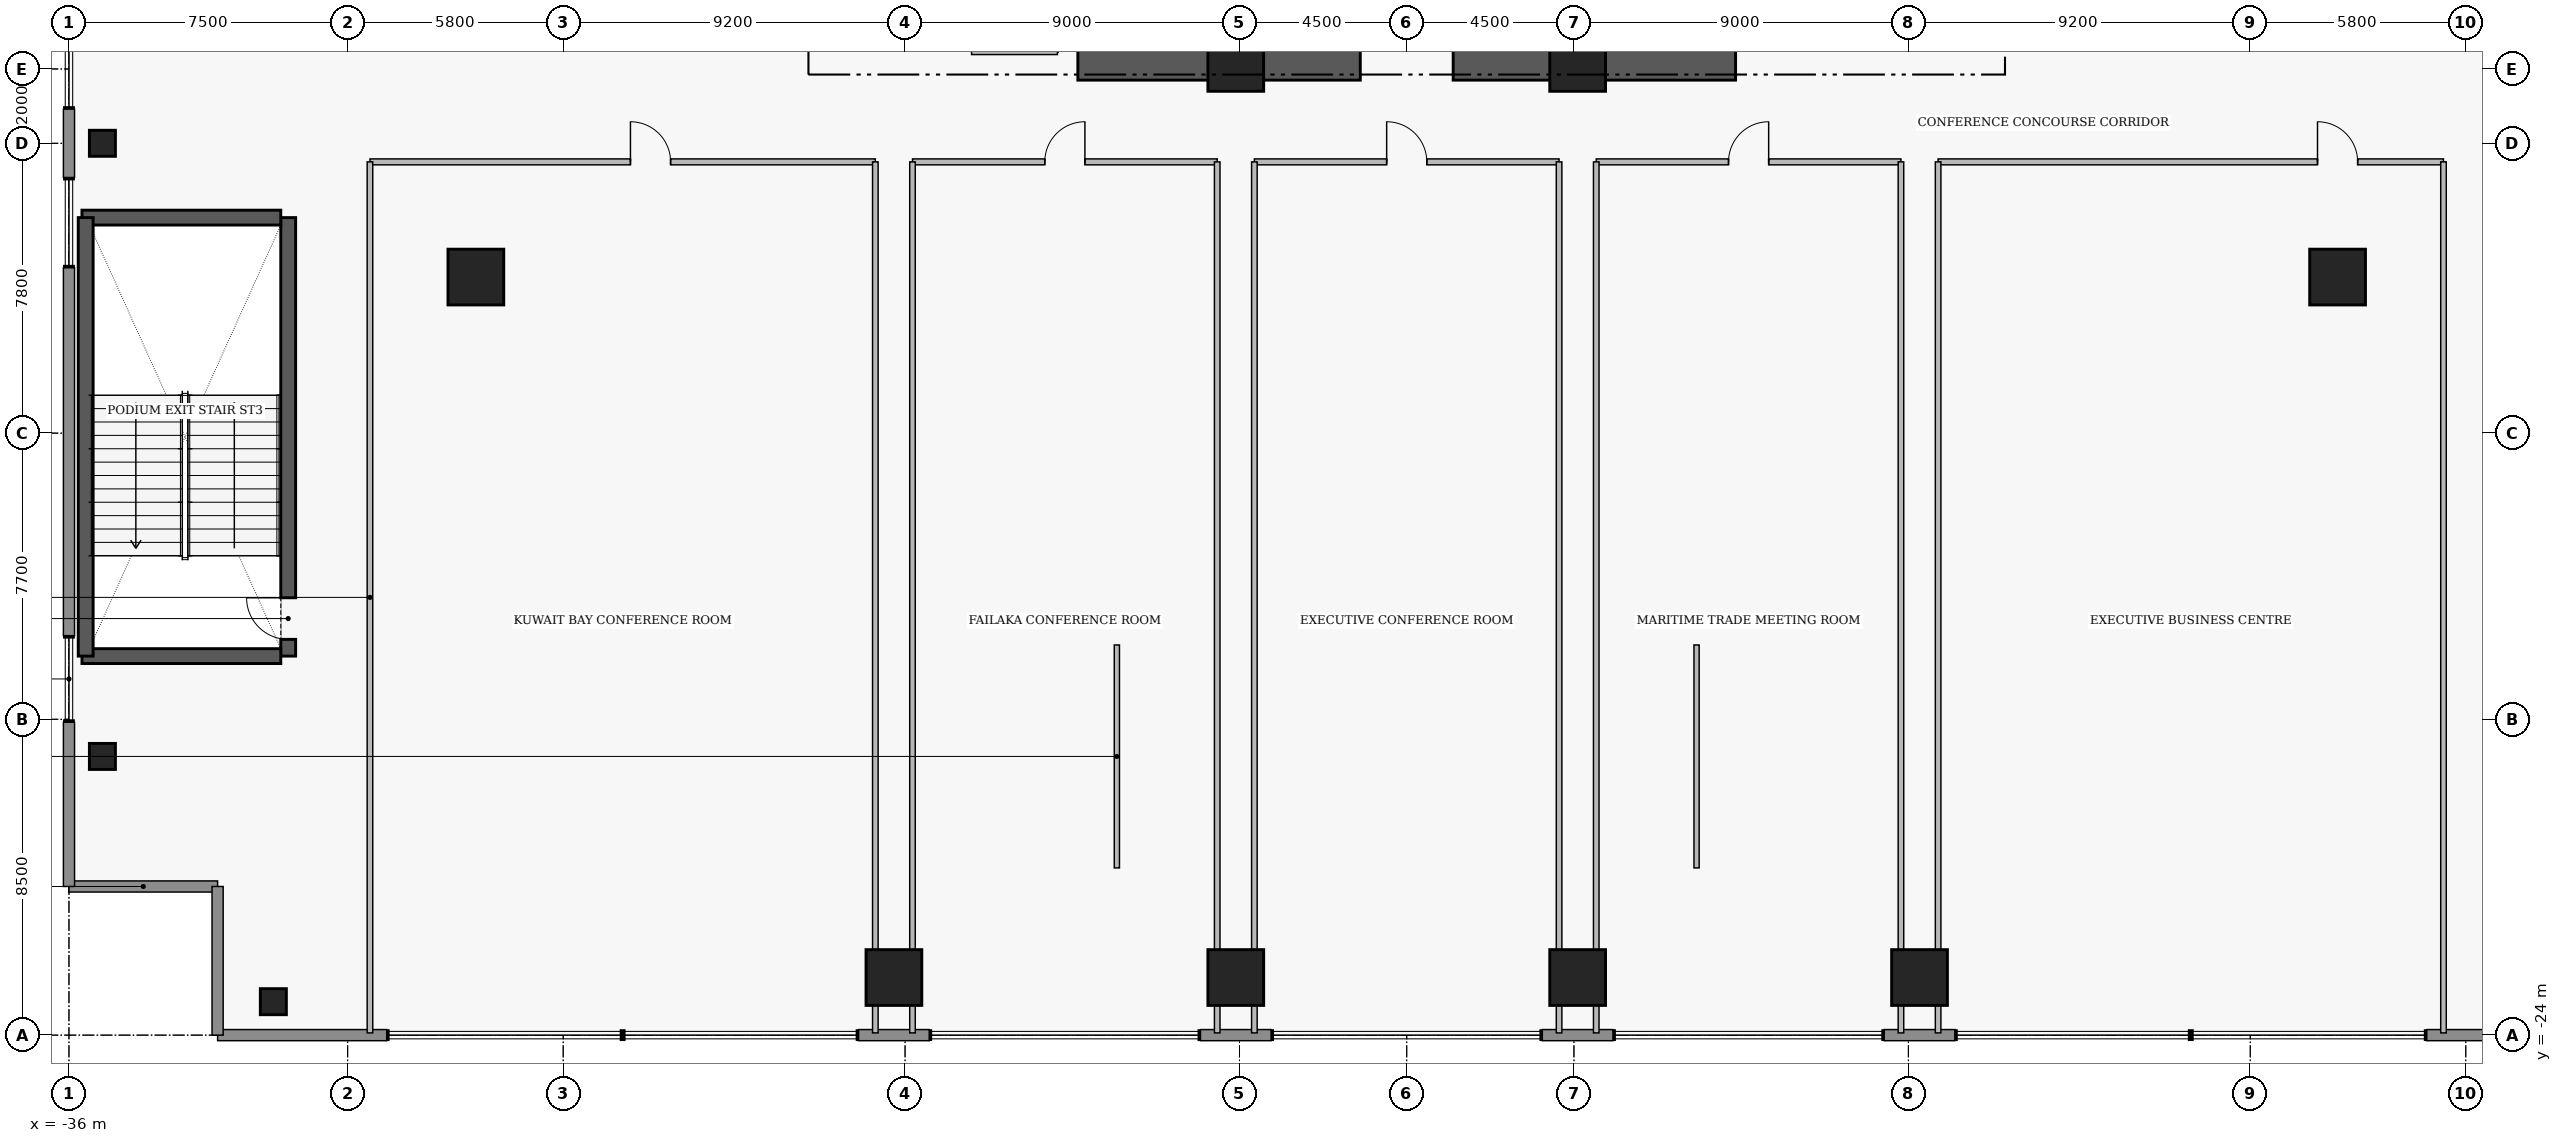
"""IFC4 building model, lengths in metres.
Left out: names, types, materials, properties, quantities, classifications, styles, units other than length and angle.
Written with IfcOpenShell. Run it as: python <this file> out.ifc"""

import sys

from ifc_helpers import new_model, si_unit, direction, frame, frame_2d, origin, origin_2d, place, context, subcontext, project, spatial, rectangle, extrude, element, fill, save


model = new_model("IFC4")
c1 = context("Model", 3, precision=1e-05, world=origin(), true_north=direction((0.0, 1.0)))
c2 = subcontext(c1, "Body", "Model", "MODEL_VIEW")
j1 = project(units=[si_unit("LENGTHUNIT", "METRE"), si_unit("PLANEANGLEUNIT", "RADIAN")], contexts=[c1])
p1 = place(None, origin())
s1 = spatial("IfcSite", under=j1, at=p1, CompositionType="ELEMENT")
p2 = place(p1, origin())
s2 = spatial("IfcBuilding", under=s1, at=p2, CompositionType="ELEMENT")
p3 = place(p2, frame((0.0, 0.0, 18.0)))
s3 = spatial("IfcBuildingStorey", under=s2, at=p3, CompositionType="ELEMENT", Elevation=18.0)
for number, where, z_axis, x_axis in (
    (1, (-8.85, 2.15, 0.0), (0.0, 0.0, 1.0), (1.0, 0.0, 0.0)),
    (2, (1.25, 2.15, 0.0), (0.0, 0.0, 1.0), (1.0, 0.0, 0.0)),
):
    element("IfcWall", number, at=place(p3, frame(where, z_axis=z_axis, x_axis=x_axis)), inside=s3, PredefinedType="SHEAR", context=c2, shape_type="SweptSolid", body=[
        extrude(rectangle(XDim=7.6, YDim=0.9, at=frame_2d((3.8, 0.0))), origin(), (0.0, 0.0, 1.0), 4.54),
    ])
p4 = place(p3, frame((-30.1, -13.8, 0.0), z_axis=(0.0, 0.0, 1.0), x_axis=(0.0, 1.0, 0.0)))
e3 = element("IfcWall", 3, at=p4, inside=s3, PredefinedType="SHEAR", context=c2, shape_type="SweptSolid", body=[
    extrude(rectangle(XDim=11.8, YDim=0.4, at=frame_2d((5.9, 0.0))), origin(), (0.0, 0.0, 1.0), 4.61),
])
p5 = place(p4, frame((0.45, 0.0, 0.0)))
e4 = element("IfcOpeningElement", 4, at=p5, cuts=e3, PredefinedType="OPENING", context=c2, shape_type="SweptSolid", body=[
    extrude(rectangle(XDim=1.12, YDim=2.22, at=frame_2d((0.56, 1.11))), frame((0.0, 0.21, 0.0), z_axis=(0.0, -1.0, 0.0), x_axis=(1.0, 0.0, 0.0)), (0.0, 0.0, 1.0), 0.42),
])
for number, where, z_axis, x_axis in (
    (5, (-35.65, -13.8, 0.0), (0.0, 0.0, 1.0), (1.0, 0.0, 0.0)),
    (6, (-35.65, -2.0, 0.0), (0.0, 0.0, 1.0), (1.0, 0.0, 0.0)),
):
    element("IfcWall", number, at=place(p3, frame(where, z_axis=z_axis, x_axis=x_axis)), inside=s3, PredefinedType="SHEAR", context=c2, shape_type="SweptSolid", body=[
        extrude(rectangle(XDim=5.35, YDim=0.4, at=frame_2d((2.675, 0.0))), origin(), (0.0, 0.0, 1.0), 4.61),
    ])
p6 = place(p3, frame((-35.55, -13.8, 0.0), z_axis=(0.0, 0.0, 1.0), x_axis=(0.0, 1.0, 0.0)))
e7 = element("IfcWall", 7, at=p6, inside=s3, PredefinedType="SHEAR", context=c2, shape_type="SweptSolid", body=[
    extrude(rectangle(XDim=11.8, YDim=0.4, at=frame_2d((5.9, 0.0))), origin(), (0.0, 0.0, 1.0), 4.61),
])
for number, where, z_axis, x_axis in (
    (8, (-4.6, 2.15, 0.0), (0.0, 0.0, 1.0), (1.0, 0.0, 0.0)),
    (9, (4.6, 2.15, 0.0), (0.0, 0.0, 1.0), (1.0, 0.0, 0.0)),
    (10, (-13.8, -22.45, 0.0), (0.0, 0.0, 1.0), (1.0, 0.0, 0.0)),
    (11, (-4.6, -22.45, 0.0), (0.0, 0.0, 1.0), (1.0, 0.0, 0.0)),
    (12, (4.6, -22.45, 0.0), (0.0, 0.0, 1.0), (1.0, 0.0, 0.0)),
    (13, (13.8, -22.45, 0.0), (0.0, 0.0, 1.0), (1.0, 0.0, 0.0)),
    (14, (-25.05, -3.6, 0.0), (0.0, 0.0, 1.0), (1.0, 0.0, 0.0)),
    (15, (25.05, -3.6, 0.0), (0.0, 0.0, 1.0), (1.0, 0.0, 0.0)),
):
    element("IfcColumn", number, at=place(p3, frame(where, z_axis=z_axis, x_axis=x_axis)), inside=s3, PredefinedType="COLUMN", context=c2, shape_type="SweptSolid", body=[
        extrude(rectangle(XDim=1.5, YDim=1.5, at=origin_2d()), origin(), (0.0, 0.0, 1.0), 4.8),
    ])
for number, where, z_axis, x_axis in (
    (16, (-30.5, -23.1, 0.0), (0.0, 0.0, 1.0), (1.0, 0.0, 0.0)),
    (17, (-35.1, -16.5, 0.0), (0.0, 0.0, 1.0), (1.0, 0.0, 0.0)),
    (18, (-35.1, 0.0, 0.0), (0.0, 0.0, 1.0), (1.0, 0.0, 0.0)),
):
    element("IfcColumn", number, at=place(p3, frame(where, z_axis=z_axis, x_axis=x_axis)), inside=s3, PredefinedType="COLUMN", context=c2, shape_type="SweptSolid", body=[
        extrude(rectangle(XDim=0.7, YDim=0.7, at=origin_2d()), origin(), (0.0, 0.0, 1.0), 4.8),
    ])
p7 = place(p3, frame((-32.0, -20.0, 0.0), z_axis=(0.0, 0.0, 1.0), x_axis=(-1.0, 0.0, 0.0)))
e19 = element("IfcWall", 19, at=p7, inside=s3, PredefinedType="STANDARD", context=c2, shape_type="SweptSolid", body=[
    extrude(rectangle(XDim=4.0, YDim=0.3, at=frame_2d((2.0, 0.0))), origin(), (0.0, 0.0, 1.0), 4.54),
])
p8 = place(p3, frame((-36.0, -20.0, 0.0), z_axis=(0.0, 0.0, 1.0), x_axis=(0.0, 1.0, 0.0)))
e20 = element("IfcWall", 20, at=p8, inside=s3, PredefinedType="STANDARD", context=c2, shape_type="SweptSolid", body=[
    extrude(rectangle(XDim=4.42, YDim=0.3, at=frame_2d((2.21, 0.0))), origin(), (0.0, 0.0, 1.0), 4.54),
])
p9 = place(p3, frame((-36.0, -13.25, 0.0), z_axis=(0.0, 0.0, 1.0), x_axis=(0.0, 1.0, 0.0)))
e21 = element("IfcWall", 21, at=p9, inside=s3, PredefinedType="STANDARD", context=c2, shape_type="SweptSolid", body=[
    extrude(rectangle(XDim=9.9, YDim=0.3, at=frame_2d((4.95, 0.0))), origin(), (0.0, 0.0, 1.0), 4.54),
])
p10 = place(p3, frame((-36.0, -0.92, 0.0), z_axis=(0.0, 0.0, 1.0), x_axis=(0.0, 1.0, 0.0)))
e22 = element("IfcWall", 22, at=p10, inside=s3, PredefinedType="STANDARD", context=c2, shape_type="SweptSolid", body=[
    extrude(rectangle(XDim=1.84, YDim=0.3, at=frame_2d((0.92, 0.0))), origin(), (0.0, 0.0, 1.0), 4.54),
])
p11 = place(p3, frame((32.0, -24.0, 0.0), z_axis=(0.0, 0.0, 1.0), x_axis=(-1.0, 0.0, 0.0)))
e23 = element("IfcWall", 23, at=p11, inside=s3, PredefinedType="STANDARD", context=c2, shape_type="SweptSolid", body=[
    extrude(rectangle(XDim=4.55, YDim=0.3, at=frame_2d((2.275, 0.0))), origin(), (0.0, 0.0, 1.0), 4.54),
])
p12 = place(p3, frame((14.75, -24.0, 0.0), z_axis=(0.0, 0.0, 1.0), x_axis=(-1.0, 0.0, 0.0)))
e24 = element("IfcWall", 24, at=p12, inside=s3, PredefinedType="STANDARD", context=c2, shape_type="SweptSolid", body=[
    extrude(rectangle(XDim=1.9, YDim=0.3, at=frame_2d((0.95, 0.0))), origin(), (0.0, 0.0, 1.0), 4.54),
])
for number, where, z_axis, x_axis in (
    (25, (5.55, -24.0, 0.0), (0.0, 0.0, 1.0), (-1.0, 0.0, 0.0)),
    (26, (-3.65, -24.0, 0.0), (0.0, 0.0, 1.0), (-1.0, 0.0, 0.0)),
):
    element("IfcWall", number, at=place(p3, frame(where, z_axis=z_axis, x_axis=x_axis)), inside=s3, PredefinedType="STANDARD", context=c2, shape_type="SweptSolid", body=[
        extrude(rectangle(XDim=1.9, YDim=0.3, at=frame_2d((0.95, 0.0))), origin(), (0.0, 0.0, 1.0), 4.54),
    ])
p13 = place(p3, frame((-12.85, -24.0, 0.0), z_axis=(0.0, 0.0, 1.0), x_axis=(-1.0, 0.0, 0.0)))
e27 = element("IfcWall", 27, at=p13, inside=s3, PredefinedType="STANDARD", context=c2, shape_type="SweptSolid", body=[
    extrude(rectangle(XDim=1.9, YDim=0.3, at=frame_2d((0.95, 0.0))), origin(), (0.0, 0.0, 1.0), 4.54),
])
p14 = place(p3, frame((-27.45, -24.0, 0.0), z_axis=(0.0, 0.0, 1.0), x_axis=(-1.0, 0.0, 0.0)))
e28 = element("IfcWall", 28, at=p14, inside=s3, PredefinedType="STANDARD", context=c2, shape_type="SweptSolid", body=[
    extrude(rectangle(XDim=4.55, YDim=0.3, at=frame_2d((2.275, 0.0))), origin(), (0.0, 0.0, 1.0), 4.54),
])
p15 = place(p3, frame((-32.0, -24.0, 0.0), z_axis=(0.0, 0.0, 1.0), x_axis=(0.0, 1.0, 0.0)))
e29 = element("IfcWall", 29, at=p15, inside=s3, PredefinedType="STANDARD", context=c2, shape_type="SweptSolid", body=[
    extrude(rectangle(XDim=4.0, YDim=0.3, at=frame_2d((2.0, 0.0))), origin(), (0.0, 0.0, 1.0), 4.54),
])
p16 = place(p3, frame((-27.9, -0.5, 0.0), z_axis=(0.0, 0.0, 1.0), x_axis=(1.0, 0.0, 0.0)))
e30 = element("IfcWall", 30, at=p16, inside=s3, PredefinedType="PARTITIONING", context=c2, shape_type="SweptSolid", body=[
    extrude(rectangle(XDim=13.6, YDim=0.16, at=frame_2d((6.8, 0.0))), origin(), (0.0, 0.0, 1.0), 4.54),
])
p17 = place(p16, frame((7.01, 0.0, 0.0)))
e31 = element("IfcOpeningElement", 31, at=p17, cuts=e30, PredefinedType="OPENING", context=c2, shape_type="SweptSolid", body=[
    extrude(rectangle(XDim=1.08, YDim=2.18, at=frame_2d((0.54, 1.09))), frame((0.0, 0.09, 0.0), z_axis=(0.0, -1.0, 0.0), x_axis=(1.0, 0.0, 0.0)), (0.0, 0.0, 1.0), 0.18),
])
p18 = place(p3, frame((-13.3, -0.5, 0.0), z_axis=(0.0, 0.0, 1.0), x_axis=(1.0, 0.0, 0.0)))
e32 = element("IfcWall", 32, at=p18, inside=s3, PredefinedType="PARTITIONING", context=c2, shape_type="SweptSolid", body=[
    extrude(rectangle(XDim=8.2, YDim=0.16, at=frame_2d((4.1, 0.0))), origin(), (0.0, 0.0, 1.0), 4.54),
])
p19 = place(p18, frame((3.56, 0.0, 0.0)))
e33 = element("IfcOpeningElement", 33, at=p19, cuts=e32, PredefinedType="OPENING", context=c2, shape_type="SweptSolid", body=[
    extrude(rectangle(XDim=1.08, YDim=2.18, at=frame_2d((0.54, 1.09))), frame((0.0, 0.09, 0.0), z_axis=(0.0, -1.0, 0.0), x_axis=(1.0, 0.0, 0.0)), (0.0, 0.0, 1.0), 0.18),
])
p20 = place(p3, frame((-4.1, -0.5, 0.0), z_axis=(0.0, 0.0, 1.0), x_axis=(1.0, 0.0, 0.0)))
e34 = element("IfcWall", 34, at=p20, inside=s3, PredefinedType="PARTITIONING", context=c2, shape_type="SweptSolid", body=[
    extrude(rectangle(XDim=8.2, YDim=0.16, at=frame_2d((4.1, 0.0))), origin(), (0.0, 0.0, 1.0), 4.54),
])
p21 = place(p20, frame((3.56, 0.0, 0.0)))
e35 = element("IfcOpeningElement", 35, at=p21, cuts=e34, PredefinedType="OPENING", context=c2, shape_type="SweptSolid", body=[
    extrude(rectangle(XDim=1.08, YDim=2.18, at=frame_2d((0.54, 1.09))), frame((0.0, 0.09, 0.0), z_axis=(0.0, -1.0, 0.0), x_axis=(1.0, 0.0, 0.0)), (0.0, 0.0, 1.0), 0.18),
])
p22 = place(p3, frame((5.1, -0.5, 0.0), z_axis=(0.0, 0.0, 1.0), x_axis=(1.0, 0.0, 0.0)))
e36 = element("IfcWall", 36, at=p22, inside=s3, PredefinedType="PARTITIONING", context=c2, shape_type="SweptSolid", body=[
    extrude(rectangle(XDim=8.2, YDim=0.16, at=frame_2d((4.1, 0.0))), origin(), (0.0, 0.0, 1.0), 4.54),
])
p23 = place(p22, frame((3.56, 0.0, 0.0)))
e37 = element("IfcOpeningElement", 37, at=p23, cuts=e36, PredefinedType="OPENING", context=c2, shape_type="SweptSolid", body=[
    extrude(rectangle(XDim=1.08, YDim=2.18, at=frame_2d((0.54, 1.09))), frame((0.0, 0.09, 0.0), z_axis=(0.0, -1.0, 0.0), x_axis=(1.0, 0.0, 0.0)), (0.0, 0.0, 1.0), 0.18),
])
p24 = place(p3, frame((14.3, -0.5, 0.0), z_axis=(0.0, 0.0, 1.0), x_axis=(1.0, 0.0, 0.0)))
e38 = element("IfcWall", 38, at=p24, inside=s3, PredefinedType="PARTITIONING", context=c2, shape_type="SweptSolid", body=[
    extrude(rectangle(XDim=13.6, YDim=0.16, at=frame_2d((6.8, 0.0))), origin(), (0.0, 0.0, 1.0), 4.54),
])
p25 = place(p24, frame((10.21, 0.0, 0.0)))
e39 = element("IfcOpeningElement", 39, at=p25, cuts=e38, PredefinedType="OPENING", context=c2, shape_type="SweptSolid", body=[
    extrude(rectangle(XDim=1.08, YDim=2.18, at=frame_2d((0.54, 1.09))), frame((0.0, 0.09, 0.0), z_axis=(0.0, -1.0, 0.0), x_axis=(1.0, 0.0, 0.0)), (0.0, 0.0, 1.0), 0.18),
])
p26 = place(p3, frame((-11.71, 2.47, 0.0), z_axis=(0.0, 0.0, 1.0), x_axis=(1.0, 0.0, 0.0)))
e40 = element("IfcWall", 40, at=p26, inside=s3, PredefinedType="PARTITIONING", context=c2, shape_type="SweptSolid", body=[
    extrude(rectangle(XDim=2.31, YDim=0.165, at=frame_2d((1.155, 0.0))), origin(), (0.0, 0.0, 1.0), 3.14),
])
for number, where, z_axis, x_axis in (
    (41, (-27.9, -23.94, 0.0), (0.0, 0.0, 1.0), (0.0, 1.0, 0.0)),
    (42, (-14.3, -23.94, 0.0), (0.0, 0.0, 1.0), (0.0, 1.0, 0.0)),
    (43, (-13.3, -23.94, 0.0), (0.0, 0.0, 1.0), (0.0, 1.0, 0.0)),
    (44, (-5.1, -23.94, 0.0), (0.0, 0.0, 1.0), (0.0, 1.0, 0.0)),
    (45, (-4.1, -23.94, 0.0), (0.0, 0.0, 1.0), (0.0, 1.0, 0.0)),
    (46, (4.1, -23.94, 0.0), (0.0, 0.0, 1.0), (0.0, 1.0, 0.0)),
    (47, (5.1, -23.94, 0.0), (0.0, 0.0, 1.0), (0.0, 1.0, 0.0)),
    (48, (13.3, -23.94, 0.0), (0.0, 0.0, 1.0), (0.0, 1.0, 0.0)),
    (49, (14.3, -23.94, 0.0), (0.0, 0.0, 1.0), (0.0, 1.0, 0.0)),
    (50, (27.9, -23.94, 0.0), (0.0, 0.0, 1.0), (0.0, 1.0, 0.0)),
):
    element("IfcWall", number, at=place(p3, frame(where, z_axis=z_axis, x_axis=x_axis)), inside=s3, PredefinedType="PARTITIONING", context=c2, shape_type="SweptSolid", body=[
        extrude(rectangle(XDim=23.44, YDim=0.15, at=frame_2d((11.72, 0.0))), origin(), (0.0, 0.0, 1.0), 4.54),
    ])
for number, where, z_axis, x_axis in (
    (51, (-7.8, -19.5, 0.0), (0.0, 0.0, 1.0), (0.0, 1.0, 0.0)),
    (52, (7.8, -19.5, 0.0), (0.0, 0.0, 1.0), (0.0, 1.0, 0.0)),
):
    element("IfcWall", number, at=place(p3, frame(where, z_axis=z_axis, x_axis=x_axis)), inside=s3, PredefinedType="MOVABLE", context=c2, shape_type="SweptSolid", body=[
        extrude(rectangle(XDim=6.0, YDim=0.14, at=frame_2d((3.0, 0.0))), origin(), (0.0, 0.0, 1.0), 4.54),
    ])
p27 = place(p5, origin())
e53 = element("IfcDoor", 53, at=p27, inside=s3, OperationType="SINGLE_SWING_RIGHT", PredefinedType="DOOR", context=c2, shape_type="SweptSolid", body=[
    extrude(rectangle(XDim=1.12, YDim=2.22, at=frame_2d((0.56, 1.11))), frame((0.0, 0.025, 0.0), z_axis=(0.0, -1.0, 0.0), x_axis=(1.0, 0.0, 0.0)), (0.0, 0.0, 1.0), 0.05),
])
fill(e4, e53)
p28 = place(p17, origin())
e54 = element("IfcDoor", 54, at=p28, inside=s3, OperationType="SINGLE_SWING_LEFT", PredefinedType="DOOR", context=c2, shape_type="SweptSolid", body=[
    extrude(rectangle(XDim=1.08, YDim=2.18, at=frame_2d((0.54, 1.09))), frame((0.0, 0.025, 0.0), z_axis=(0.0, -1.0, 0.0), x_axis=(1.0, 0.0, 0.0)), (0.0, 0.0, 1.0), 0.05),
])
fill(e31, e54)
p29 = place(p19, origin())
e55 = element("IfcDoor", 55, at=p29, inside=s3, OperationType="SINGLE_SWING_RIGHT", PredefinedType="DOOR", context=c2, shape_type="SweptSolid", body=[
    extrude(rectangle(XDim=1.08, YDim=2.18, at=frame_2d((0.54, 1.09))), frame((0.0, 0.025, 0.0), z_axis=(0.0, -1.0, 0.0), x_axis=(1.0, 0.0, 0.0)), (0.0, 0.0, 1.0), 0.05),
])
fill(e33, e55)
p30 = place(p21, origin())
e56 = element("IfcDoor", 56, at=p30, inside=s3, OperationType="SINGLE_SWING_LEFT", PredefinedType="DOOR", context=c2, shape_type="SweptSolid", body=[
    extrude(rectangle(XDim=1.08, YDim=2.18, at=frame_2d((0.54, 1.09))), frame((0.0, 0.025, 0.0), z_axis=(0.0, -1.0, 0.0), x_axis=(1.0, 0.0, 0.0)), (0.0, 0.0, 1.0), 0.05),
])
fill(e35, e56)
p31 = place(p23, origin())
e57 = element("IfcDoor", 57, at=p31, inside=s3, OperationType="SINGLE_SWING_RIGHT", PredefinedType="DOOR", context=c2, shape_type="SweptSolid", body=[
    extrude(rectangle(XDim=1.08, YDim=2.18, at=frame_2d((0.54, 1.09))), frame((0.0, 0.025, 0.0), z_axis=(0.0, -1.0, 0.0), x_axis=(1.0, 0.0, 0.0)), (0.0, 0.0, 1.0), 0.05),
])
fill(e37, e57)
p32 = place(p25, origin())
e58 = element("IfcDoor", 58, at=p32, inside=s3, OperationType="SINGLE_SWING_LEFT", PredefinedType="DOOR", context=c2, shape_type="SweptSolid", body=[
    extrude(rectangle(XDim=1.08, YDim=2.18, at=frame_2d((0.54, 1.09))), frame((0.0, 0.025, 0.0), z_axis=(0.0, -1.0, 0.0), x_axis=(1.0, 0.0, 0.0)), (0.0, 0.0, 1.0), 0.05),
])
fill(e39, e58)
save(model, sys.argv[1])
